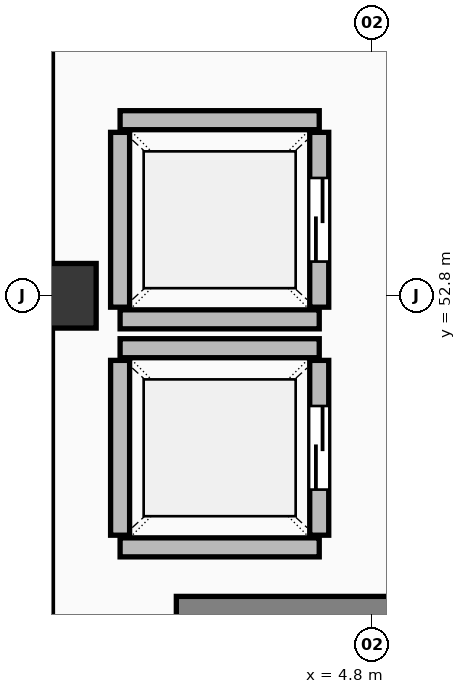
"""IFC4 building model, lengths in metres.
Left out: names, types, materials, properties, quantities, classifications, styles, units other than length and angle.
Written with IfcOpenShell. Run it as: python <this file> out.ifc"""

import sys

from ifc_helpers import new_model, si_unit, direction, frame, frame_2d, origin, origin_2d, place, context, subcontext, project, spatial, rectangle, extrude, element, fill, save


model = new_model("IFC4")
c1 = context("Model", 3, precision=1e-05, world=origin(), true_north=direction((0.0, 1.0)))
c2 = subcontext(c1, "Body", "Model", "MODEL_VIEW")
j1 = project(units=[si_unit("LENGTHUNIT", "METRE"), si_unit("PLANEANGLEUNIT", "RADIAN")], contexts=[c1])
p1 = place(None, origin())
s1 = spatial("IfcSite", under=j1, at=p1, CompositionType="ELEMENT")
p2 = place(p1, origin())
s2 = spatial("IfcBuilding", under=s1, at=p2, CompositionType="ELEMENT")
p3 = place(p2, frame((0.0, 0.0, -4.2)))
s3 = spatial("IfcBuildingStorey", under=s2, at=p3, CompositionType="ELEMENT", Elevation=-4.2)
p4 = place(p3, frame((0.75, 52.8, 0.0), z_axis=(0.0, 0.0, 1.0), x_axis=(1.0, 0.0, 0.0)))
e1 = element("IfcColumn", 1, at=p4, inside=s3, PredefinedType="COLUMN", context=c2, shape_type="SweptSolid", body=[
    extrude(rectangle(XDim=0.85, YDim=0.85, at=origin_2d()), origin(), (0.0, 0.0, 1.0), 4.2),
])
p5 = place(p3, frame((2.23, 48.62, 0.0), z_axis=(0.0, 0.0, 1.0), x_axis=(1.0, 0.0, 0.0)))
e2 = element("IfcWall", 2, at=p5, inside=s3, PredefinedType="SHEAR", context=c2, shape_type="SweptSolid", body=[
    extrude(rectangle(XDim=5.15, YDim=0.45, at=frame_2d((2.575, 0.0))), origin(), (0.0, 0.0, 1.0), 3.78),
])
for number, where, z_axis, x_axis in (
    (3, (1.49, 49.49, 0.0), (0.0, 0.0, 1.0), (1.0, 0.0, 0.0)),
    (4, (1.49, 52.11, 0.0), (0.0, 0.0, 1.0), (1.0, 0.0, 0.0)),
):
    element("IfcWall", number, at=place(p3, frame(where, z_axis=z_axis, x_axis=x_axis)), inside=s3, PredefinedType="SOLIDWALL", context=c2, shape_type="SweptSolid", body=[
        extrude(rectangle(XDim=2.62, YDim=0.25, at=frame_2d((1.31, 0.0))), origin(), (0.0, 0.0, 1.0), 3.78),
    ])
p6 = place(p3, frame((1.49, 49.65, 0.0), z_axis=(0.0, 0.0, 1.0), x_axis=(0.0, 1.0, 0.0)))
e5 = element("IfcWall", 5, at=p6, inside=s3, PredefinedType="SOLIDWALL", context=c2, shape_type="SweptSolid", body=[
    extrude(rectangle(XDim=2.3, YDim=0.25, at=frame_2d((1.15, 0.0))), origin(), (0.0, 0.0, 1.0), 3.78),
])
p7 = place(p3, frame((4.11, 49.65, 0.0), z_axis=(0.0, 0.0, 1.0), x_axis=(0.0, 1.0, 0.0)))
e6 = element("IfcWall", 6, at=p7, inside=s3, PredefinedType="SOLIDWALL", context=c2, shape_type="SweptSolid", body=[
    extrude(rectangle(XDim=2.3, YDim=0.25, at=frame_2d((1.15, 0.0))), origin(), (0.0, 0.0, 1.0), 3.78),
])
p8 = place(p7, frame((0.6, 0.0, 0.0)))
e7 = element("IfcOpeningElement", 7, at=p8, cuts=e6, PredefinedType="OPENING", context=c2, shape_type="SweptSolid", body=[
    extrude(rectangle(XDim=1.1, YDim=2.2, at=frame_2d((0.55, 1.1))), frame((0.0, 0.137, 0.0), z_axis=(0.0, -1.0, 0.0), x_axis=(1.0, 0.0, 0.0)), (0.0, 0.0, 1.0), 0.274),
])
p9 = place(p3, frame((1.49, 52.49, 0.0), z_axis=(0.0, 0.0, 1.0), x_axis=(1.0, 0.0, 0.0)))
e8 = element("IfcWall", 8, at=p9, inside=s3, PredefinedType="SOLIDWALL", context=c2, shape_type="SweptSolid", body=[
    extrude(rectangle(XDim=2.62, YDim=0.25, at=frame_2d((1.31, 0.0))), origin(), (0.0, 0.0, 1.0), 2.932),
])
p10 = place(p3, frame((1.49, 55.11, 0.0), z_axis=(0.0, 0.0, 1.0), x_axis=(1.0, 0.0, 0.0)))
e9 = element("IfcWall", 9, at=p10, inside=s3, PredefinedType="SOLIDWALL", context=c2, shape_type="SweptSolid", body=[
    extrude(rectangle(XDim=2.62, YDim=0.25, at=frame_2d((1.31, 0.0))), origin(), (0.0, 0.0, 1.0), 3.78),
])
p11 = place(p3, frame((1.49, 52.65, 0.0), z_axis=(0.0, 0.0, 1.0), x_axis=(0.0, 1.0, 0.0)))
e10 = element("IfcWall", 10, at=p11, inside=s3, PredefinedType="SOLIDWALL", context=c2, shape_type="SweptSolid", body=[
    extrude(rectangle(XDim=2.3, YDim=0.25, at=frame_2d((1.15, 0.0))), origin(), (0.0, 0.0, 1.0), 2.932),
])
p12 = place(p3, frame((4.11, 52.65, 0.0), z_axis=(0.0, 0.0, 1.0), x_axis=(0.0, 1.0, 0.0)))
e11 = element("IfcWall", 11, at=p12, inside=s3, PredefinedType="SOLIDWALL", context=c2, shape_type="SweptSolid", body=[
    extrude(rectangle(XDim=2.3, YDim=0.25, at=frame_2d((1.15, 0.0))), origin(), (0.0, 0.0, 1.0), 2.932),
])
p13 = place(p12, frame((0.6, 0.0, 0.0)))
e12 = element("IfcOpeningElement", 12, at=p13, cuts=e11, PredefinedType="OPENING", context=c2, shape_type="SweptSolid", body=[
    extrude(rectangle(XDim=1.1, YDim=2.2, at=frame_2d((0.55, 1.1))), frame((0.0, 0.137, 0.0), z_axis=(0.0, -1.0, 0.0), x_axis=(1.0, 0.0, 0.0)), (0.0, 0.0, 1.0), 0.274),
])
p14 = place(p8, origin())
e13 = element("IfcDoor", 13, at=p14, inside=s3, OperationType="SLIDING_TO_LEFT", PredefinedType="DOOR", context=c2, shape_type="SweptSolid", body=[
    extrude(rectangle(XDim=1.1, YDim=2.2, at=frame_2d((0.55, 1.1))), frame((0.0, 0.025, 0.0), z_axis=(0.0, -1.0, 0.0), x_axis=(1.0, 0.0, 0.0)), (0.0, 0.0, 1.0), 0.05),
])
fill(e7, e13)
p15 = place(p13, origin())
e14 = element("IfcDoor", 14, at=p15, inside=s3, OperationType="SLIDING_TO_LEFT", PredefinedType="DOOR", context=c2, shape_type="SweptSolid", body=[
    extrude(rectangle(XDim=1.1, YDim=2.2, at=frame_2d((0.55, 1.1))), frame((0.0, 0.025, 0.0), z_axis=(0.0, -1.0, 0.0), x_axis=(1.0, 0.0, 0.0)), (0.0, 0.0, 1.0), 0.05),
])
fill(e12, e14)
save(model, sys.argv[1])
